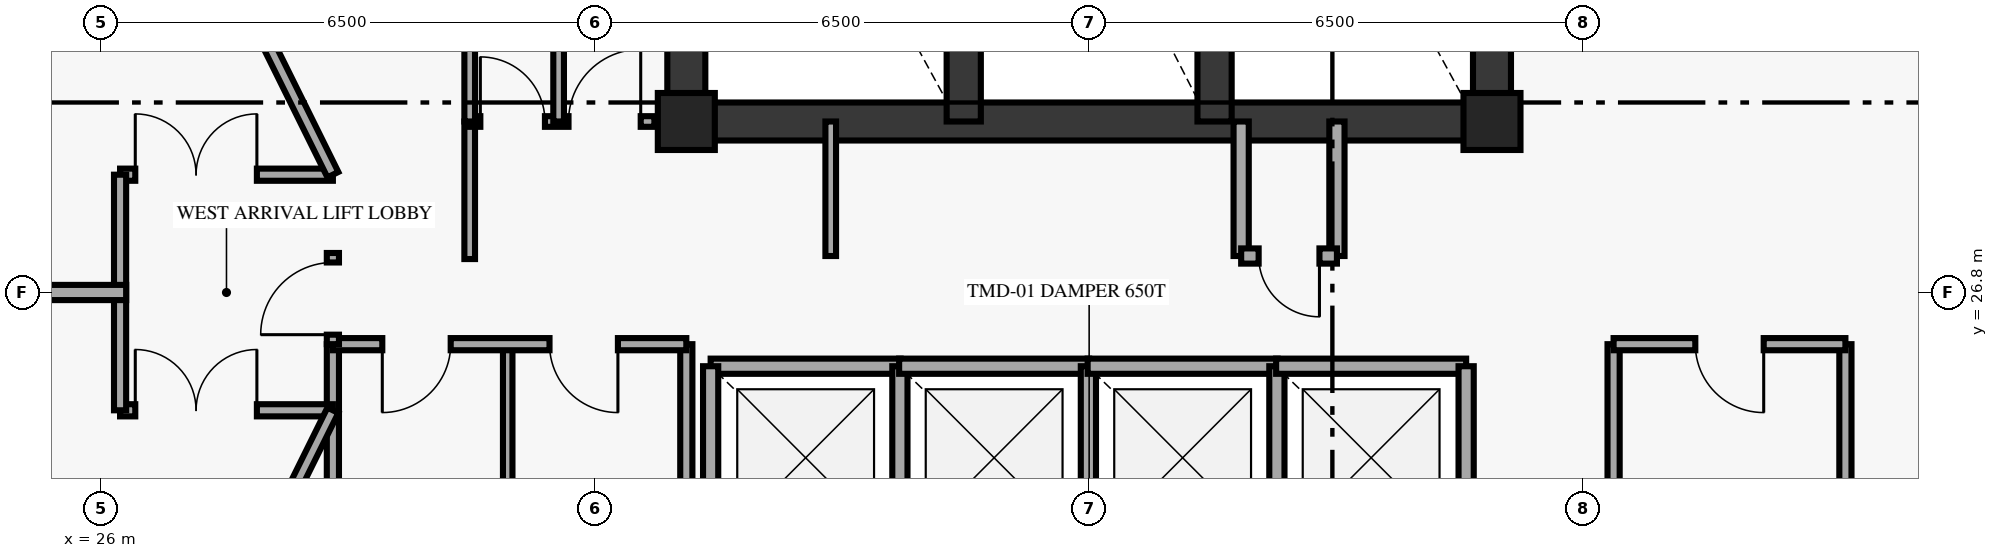
"""IFC4 building model, lengths in metres.
Left out: names, types, materials, properties, quantities, classifications, styles, units other than length and angle.
Written with IfcOpenShell. Run it as: python <this file> out.ifc"""

import sys

from ifc_helpers import new_model, si_unit, direction, frame, frame_2d, origin, origin_2d, place, context, subcontext, project, spatial, rectangle, extrude, element, fill, save


model = new_model("IFC4")
c1 = context("Model", 3, precision=1e-05, world=origin(), true_north=direction((0.0, 1.0)))
c2 = subcontext(c1, "Body", "Model", "MODEL_VIEW")
j1 = project(units=[si_unit("LENGTHUNIT", "METRE"), si_unit("PLANEANGLEUNIT", "RADIAN")], contexts=[c1])
p1 = place(None, origin())
s1 = spatial("IfcSite", under=j1, at=p1, CompositionType="ELEMENT")
p2 = place(p1, origin())
s2 = spatial("IfcBuilding", under=s1, at=p2, CompositionType="ELEMENT")
p3 = place(p2, frame((0.0, 0.0, 306.8)))
s3 = spatial("IfcBuildingStorey", under=s2, at=p3, CompositionType="ELEMENT", Elevation=306.8)
for number, where, z_axis, x_axis in (
    (1, (44.3, 29.05, 0.0), (0.0, 0.0, 1.0), (1.0, 0.0, 0.0)),
    (2, (33.7, 29.05, 0.0), (0.0, 0.0, 1.0), (1.0, 0.0, 0.0)),
):
    element("IfcColumn", number, at=place(p3, frame(where, z_axis=z_axis, x_axis=x_axis)), inside=s3, PredefinedType="PILASTER", context=c2, shape_type="SweptSolid", body=[
        extrude(rectangle(XDim=0.75, YDim=0.75, at=origin_2d()), origin(), (0.0, 0.0, 1.0), 6.18),
    ])
for number, where, z_axis, x_axis in (
    (3, (33.7, 29.05, 0.0), (0.0, 0.0, 1.0), (0.0, 1.0, 0.0)),
    (4, (44.3, 29.05, 0.0), (0.0, 0.0, 1.0), (0.0, 1.0, 0.0)),
):
    element("IfcWall", number, at=place(p3, frame(where, z_axis=z_axis, x_axis=x_axis)), inside=s3, PredefinedType="SHEAR", context=c2, shape_type="SweptSolid", body=[
        extrude(rectangle(XDim=8.35, YDim=0.5, at=frame_2d((4.175, 0.0))), origin(), (0.0, 0.0, 1.0), 6.18),
    ])
p4 = place(p3, frame((33.7, 29.05, 0.0), z_axis=(0.0, 0.0, 1.0), x_axis=(1.0, 0.0, 0.0)))
e5 = element("IfcWall", 5, at=p4, inside=s3, PredefinedType="SHEAR", context=c2, shape_type="SweptSolid", body=[
    extrude(rectangle(XDim=10.6, YDim=0.5, at=frame_2d((5.3, 0.0))), origin(), (0.0, 0.0, 1.0), 6.18),
])
for number, where, z_axis, x_axis in (
    (6, (37.35, 29.05, 0.0), (0.0, 0.0, 1.0), (0.0, 1.0, 0.0)),
    (7, (40.65, 29.05, 0.0), (0.0, 0.0, 1.0), (0.0, 1.0, 0.0)),
):
    element("IfcWall", number, at=place(p3, frame(where, z_axis=z_axis, x_axis=x_axis)), inside=s3, PredefinedType="SHEAR", context=c2, shape_type="SweptSolid", body=[
        extrude(rectangle(XDim=8.35, YDim=0.45, at=frame_2d((4.175, 0.0))), origin(), (0.0, 0.0, 1.0), 6.18),
    ])
p5 = place(p3, frame((35.6, 27.28, 0.0), z_axis=(0.0, 0.0, 1.0), x_axis=(0.0, 1.0, 0.0)))
e8 = element("IfcWall", 8, at=p5, inside=s3, PredefinedType="PARTITIONING", context=c2, shape_type="SweptSolid", body=[
    extrude(rectangle(XDim=1.77, YDim=0.14, at=frame_2d((0.885, 0.0))), origin(), (0.0, 0.0, 1.0), 6.18),
])
p6 = place(p3, frame((41.0, 27.28, 0.0), z_axis=(0.0, 0.0, 1.0), x_axis=(0.0, 1.0, 0.0)))
e9 = element("IfcWall", 9, at=p6, inside=s3, PredefinedType="SOLIDWALL", context=c2, shape_type="SweptSolid", body=[
    extrude(rectangle(XDim=1.77, YDim=0.2, at=frame_2d((0.885, 0.0))), origin(), (0.0, 0.0, 1.0), 5.23),
])
p7 = place(p3, frame((42.26, 27.28, 0.0), z_axis=(0.0, 0.0, 1.0), x_axis=(0.0, 1.0, 0.0)))
e10 = element("IfcWall", 10, at=p7, inside=s3, PredefinedType="SOLIDWALL", context=c2, shape_type="SweptSolid", body=[
    extrude(rectangle(XDim=1.77, YDim=0.2, at=frame_2d((0.885, 0.0))), origin(), (0.0, 0.0, 1.0), 6.18),
])
p8 = place(p3, frame((41.0, 27.28, 0.0), z_axis=(0.0, 0.0, 1.0), x_axis=(1.0, 0.0, 0.0)))
e11 = element("IfcWall", 11, at=p8, inside=s3, PredefinedType="SOLIDWALL", context=c2, shape_type="SweptSolid", body=[
    extrude(rectangle(XDim=1.26, YDim=0.2, at=frame_2d((0.63, 0.0))), origin(), (0.0, 0.0, 1.0), 6.18),
])
p9 = place(p8, frame((0.23, 0.0, 0.0)))
e12 = element("IfcOpeningElement", 12, at=p9, cuts=e11, PredefinedType="OPENING", context=c2, shape_type="SweptSolid", body=[
    extrude(rectangle(XDim=0.8, YDim=2.05, at=frame_2d((0.4, 1.025))), frame((0.0, 0.11, 0.0), z_axis=(0.0, -1.0, 0.0), x_axis=(1.0, 0.0, 0.0)), (0.0, 0.0, 1.0), 0.22),
])
p10 = place(p3, frame((34.02, 25.83, 0.0), z_axis=(0.0, 0.0, 1.0), x_axis=(1.0, 0.0, 0.0)))
e13 = element("IfcWall", 13, at=p10, inside=s3, PredefinedType="SOLIDWALL", context=c2, shape_type="SweptSolid", body=[
    extrude(rectangle(XDim=2.5, YDim=0.2, at=frame_2d((1.25, 0.0))), origin(), (0.0, 0.0, 1.0), 6.18),
])
for number, where, z_axis, x_axis in (
    (14, (34.02, 23.42, 0.0), (0.0, 0.0, 1.0), (0.0, 1.0, 0.0)),
    (15, (36.51, 23.42, 0.0), (0.0, 0.0, 1.0), (0.0, 1.0, 0.0)),
):
    element("IfcWall", number, at=place(p3, frame(where, z_axis=z_axis, x_axis=x_axis)), inside=s3, PredefinedType="SOLIDWALL", context=c2, shape_type="SweptSolid", body=[
        extrude(rectangle(XDim=2.41, YDim=0.2, at=frame_2d((1.205, 0.0))), origin(), (0.0, 0.0, 1.0), 6.18),
    ])
p11 = place(p3, frame((36.5, 25.83, 0.0), z_axis=(0.0, 0.0, 1.0), x_axis=(1.0, 0.0, 0.0)))
e16 = element("IfcWall", 16, at=p11, inside=s3, PredefinedType="SOLIDWALL", context=c2, shape_type="SweptSolid", body=[
    extrude(rectangle(XDim=2.5, YDim=0.2, at=frame_2d((1.25, 0.0))), origin(), (0.0, 0.0, 1.0), 6.18),
])
p12 = place(p3, frame((38.99, 23.42, 0.0), z_axis=(0.0, 0.0, 1.0), x_axis=(0.0, 1.0, 0.0)))
e17 = element("IfcWall", 17, at=p12, inside=s3, PredefinedType="SOLIDWALL", context=c2, shape_type="SweptSolid", body=[
    extrude(rectangle(XDim=2.41, YDim=0.2, at=frame_2d((1.205, 0.0))), origin(), (0.0, 0.0, 1.0), 6.18),
])
p13 = place(p3, frame((38.98, 25.83, 0.0), z_axis=(0.0, 0.0, 1.0), x_axis=(1.0, 0.0, 0.0)))
e18 = element("IfcWall", 18, at=p13, inside=s3, PredefinedType="SOLIDWALL", context=c2, shape_type="SweptSolid", body=[
    extrude(rectangle(XDim=2.5, YDim=0.2, at=frame_2d((1.25, 0.0))), origin(), (0.0, 0.0, 1.0), 6.18),
])
p14 = place(p3, frame((41.47, 23.42, 0.0), z_axis=(0.0, 0.0, 1.0), x_axis=(0.0, 1.0, 0.0)))
e19 = element("IfcWall", 19, at=p14, inside=s3, PredefinedType="SOLIDWALL", context=c2, shape_type="SweptSolid", body=[
    extrude(rectangle(XDim=2.41, YDim=0.2, at=frame_2d((1.205, 0.0))), origin(), (0.0, 0.0, 1.0), 6.18),
])
p15 = place(p3, frame((41.46, 25.83, 0.0), z_axis=(0.0, 0.0, 1.0), x_axis=(1.0, 0.0, 0.0)))
e20 = element("IfcWall", 20, at=p15, inside=s3, PredefinedType="SOLIDWALL", context=c2, shape_type="SweptSolid", body=[
    extrude(rectangle(XDim=2.5, YDim=0.2, at=frame_2d((1.25, 0.0))), origin(), (0.0, 0.0, 1.0), 6.18),
])
p16 = place(p3, frame((43.96, 23.42, 0.0), z_axis=(0.0, 0.0, 1.0), x_axis=(0.0, 1.0, 0.0)))
e21 = element("IfcWall", 21, at=p16, inside=s3, PredefinedType="SOLIDWALL", context=c2, shape_type="SweptSolid", body=[
    extrude(rectangle(XDim=2.41, YDim=0.2, at=frame_2d((1.205, 0.0))), origin(), (0.0, 0.0, 1.0), 6.18),
])
p17 = place(p3, frame((29.05, 19.05, 0.0), z_axis=(0.0, 0.0, 1.0), x_axis=(0.0, 1.0, 0.0)))
e22 = element("IfcWall", 22, at=p17, inside=s3, PredefinedType="PARTITIONING", context=c2, shape_type="SweptSolid", body=[
    extrude(rectangle(XDim=7.07, YDim=0.16, at=frame_2d((3.535, 0.0))), origin(), (0.0, 0.0, 1.0), 6.18),
])
p18 = place(p3, frame((33.7, 23.45, 0.0), z_axis=(0.0, 0.0, 1.0), x_axis=(0.0, 1.0, 0.0)))
e23 = element("IfcWall", 23, at=p18, inside=s3, PredefinedType="PARTITIONING", context=c2, shape_type="SweptSolid", body=[
    extrude(rectangle(XDim=2.67, YDim=0.16, at=frame_2d((1.335, 0.0))), origin(), (0.0, 0.0, 1.0), 6.18),
])
p19 = place(p3, frame((31.35, 19.05, 0.0), z_axis=(0.0, 0.0, 1.0), x_axis=(0.0, 1.0, 0.0)))
e24 = element("IfcWall", 24, at=p19, inside=s3, PredefinedType="PARTITIONING", context=c2, shape_type="SweptSolid", body=[
    extrude(rectangle(XDim=7.07, YDim=0.125, at=frame_2d((3.535, 0.0))), origin(), (0.0, 0.0, 1.0), 6.18),
])
p20 = place(p3, frame((33.7, 26.12, 0.0), z_axis=(0.0, 0.0, 1.0), x_axis=(-1.0, 0.0, 0.0)))
e25 = element("IfcWall", 25, at=p20, inside=s3, PredefinedType="PARTITIONING", context=c2, shape_type="SweptSolid", body=[
    extrude(rectangle(XDim=4.65, YDim=0.16, at=frame_2d((2.325, 0.0))), origin(), (0.0, 0.0, 1.0), 6.18),
])
p21 = place(p20, frame((3.1, 0.0, 0.0)))
e26 = element("IfcOpeningElement", 26, at=p21, cuts=e25, PredefinedType="OPENING", context=c2, shape_type="SweptSolid", body=[
    extrude(rectangle(XDim=0.9, YDim=2.1, at=frame_2d((0.45, 1.05))), frame((0.0, 0.09, 0.0), z_axis=(0.0, -1.0, 0.0), x_axis=(1.0, 0.0, 0.0)), (0.0, 0.0, 1.0), 0.18),
])
p22 = place(p20, frame((0.9, 0.0, 0.0)))
e27 = element("IfcOpeningElement", 27, at=p22, cuts=e25, PredefinedType="OPENING", context=c2, shape_type="SweptSolid", body=[
    extrude(rectangle(XDim=0.9, YDim=2.1, at=frame_2d((0.45, 1.05))), frame((0.0, 0.09, 0.0), z_axis=(0.0, -1.0, 0.0), x_axis=(1.0, 0.0, 0.0)), (0.0, 0.0, 1.0), 0.18),
])
for number, where, z_axis, x_axis in (
    (28, (48.95, 19.05, 0.0), (0.0, 0.0, 1.0), (0.0, 1.0, 0.0)),
    (29, (45.9, 19.05, 0.0), (0.0, 0.0, 1.0), (0.0, 1.0, 0.0)),
):
    element("IfcWall", number, at=place(p3, frame(where, z_axis=z_axis, x_axis=x_axis)), inside=s3, PredefinedType="PARTITIONING", context=c2, shape_type="SweptSolid", body=[
        extrude(rectangle(XDim=7.07, YDim=0.16, at=frame_2d((3.535, 0.0))), origin(), (0.0, 0.0, 1.0), 6.18),
    ])
p23 = place(p3, frame((48.95, 26.12, 0.0), z_axis=(0.0, 0.0, 1.0), x_axis=(-1.0, 0.0, 0.0)))
e30 = element("IfcWall", 30, at=p23, inside=s3, PredefinedType="PARTITIONING", context=c2, shape_type="SweptSolid", body=[
    extrude(rectangle(XDim=3.05, YDim=0.16, at=frame_2d((1.525, 0.0))), origin(), (0.0, 0.0, 1.0), 6.18),
])
p24 = place(p23, frame((1.075, 0.0, 0.0)))
e31 = element("IfcOpeningElement", 31, at=p24, cuts=e30, PredefinedType="OPENING", context=c2, shape_type="SweptSolid", body=[
    extrude(rectangle(XDim=0.9, YDim=2.1, at=frame_2d((0.45, 1.05))), frame((0.0, 0.09, 0.0), z_axis=(0.0, -1.0, 0.0), x_axis=(1.0, 0.0, 0.0)), (0.0, 0.0, 1.0), 0.18),
])
p25 = place(p3, frame((29.05, 26.12, 0.0), z_axis=(0.0, 0.0, 1.0), x_axis=(0.0, 1.0, 0.0)))
e32 = element("IfcWall", 32, at=p25, inside=s3, PredefinedType="PARTITIONING", context=c2, shape_type="SweptSolid", body=[
    extrude(rectangle(XDim=1.2, YDim=0.16, at=frame_2d((0.6, 0.0))), origin(), (0.0, 0.0, 1.0), 6.18),
])
p26 = place(p25, frame((0.125, 0.0, 0.0)))
e33 = element("IfcOpeningElement", 33, at=p26, cuts=e32, PredefinedType="OPENING", context=c2, shape_type="SweptSolid", body=[
    extrude(rectangle(XDim=0.95, YDim=2.15, at=frame_2d((0.475, 1.075))), frame((0.0, 0.09, 0.0), z_axis=(0.0, -1.0, 0.0), x_axis=(1.0, 0.0, 0.0)), (0.0, 0.0, 1.0), 0.18),
])
p27 = place(p3, frame((30.85, 27.24, 0.0), z_axis=(0.0, 0.0, 1.0), x_axis=(0.0, 1.0, 0.0)))
e34 = element("IfcWall", 34, at=p27, inside=s3, PredefinedType="PARTITIONING", context=c2, shape_type="SweptSolid", body=[
    extrude(rectangle(XDim=1.81, YDim=0.14, at=frame_2d((0.905, 0.0))), origin(), (0.0, 0.0, 1.0), 6.18),
])
p28 = place(p3, frame((30.85, 29.05, 0.0), z_axis=(0.0, 0.0, 1.0), x_axis=(1.0, 0.0, 0.0)))
e35 = element("IfcWall", 35, at=p28, inside=s3, PredefinedType="PARTITIONING", context=c2, shape_type="SweptSolid", body=[
    extrude(rectangle(XDim=2.43, YDim=0.14, at=frame_2d((1.215, 0.0))), origin(), (0.0, 0.0, 1.0), 6.18),
])
p29 = place(p28, frame((0.14, 0.0, 0.0)))
e36 = element("IfcOpeningElement", 36, at=p29, cuts=e35, PredefinedType="OPENING", context=c2, shape_type="SweptSolid", body=[
    extrude(rectangle(XDim=0.85, YDim=2.1, at=frame_2d((0.425, 1.05))), frame((0.0, 0.08, 0.0), z_axis=(0.0, -1.0, 0.0), x_axis=(1.0, 0.0, 0.0)), (0.0, 0.0, 1.0), 0.16),
])
p30 = place(p28, frame((1.3, 0.0, 0.0)))
e37 = element("IfcOpeningElement", 37, at=p30, cuts=e35, PredefinedType="OPENING", context=c2, shape_type="SweptSolid", body=[
    extrude(rectangle(XDim=0.95, YDim=2.1, at=frame_2d((0.475, 1.05))), frame((0.0, 0.08, 0.0), z_axis=(0.0, -1.0, 0.0), x_axis=(1.0, 0.0, 0.0)), (0.0, 0.0, 1.0), 0.16),
])
for number, where, z_axis, x_axis in (
    (38, (32.02, 29.05, 0.0), (0.0, 0.0, 1.0), (0.0, 1.0, 0.0)),
    (39, (30.85, 29.05, 0.0), (0.0, 0.0, 1.0), (0.0, 1.0, 0.0)),
):
    element("IfcWall", number, at=place(p3, frame(where, z_axis=z_axis, x_axis=x_axis)), inside=s3, PredefinedType="PARTITIONING", context=c2, shape_type="SweptSolid", body=[
        extrude(rectangle(XDim=5.6, YDim=0.14, at=frame_2d((2.8, 0.0))), origin(), (0.0, 0.0, 1.0), 6.18),
    ])
p31 = place(p3, frame((26.25, 28.35, 0.0), z_axis=(0.0, 0.0, 1.0), x_axis=(1.0, 0.0, 0.0)))
e40 = element("IfcWall", 40, at=p31, inside=s3, PredefinedType="PARTITIONING", context=c2, shape_type="SweptSolid", body=[
    extrude(rectangle(XDim=2.8, YDim=0.16, at=frame_2d((1.4, 0.0))), origin(), (0.0, 0.0, 1.0), 6.18),
])
p32 = place(p31, frame((0.2, 0.0, 0.0)))
e41 = element("IfcOpeningElement", 41, at=p32, cuts=e40, PredefinedType="OPENING", context=c2, shape_type="SweptSolid", body=[
    extrude(rectangle(XDim=1.6, YDim=2.2, at=frame_2d((0.8, 1.1))), frame((0.0, 0.09, 0.0), z_axis=(0.0, -1.0, 0.0), x_axis=(1.0, 0.0, 0.0)), (0.0, 0.0, 1.0), 0.18),
])
p33 = place(p3, frame((26.25, 25.25, 0.0), z_axis=(0.0, 0.0, 1.0), x_axis=(1.0, 0.0, 0.0)))
e42 = element("IfcWall", 42, at=p33, inside=s3, PredefinedType="PARTITIONING", context=c2, shape_type="SweptSolid", body=[
    extrude(rectangle(XDim=2.8, YDim=0.16, at=frame_2d((1.4, 0.0))), origin(), (0.0, 0.0, 1.0), 6.18),
])
p34 = place(p33, frame((0.2, 0.0, 0.0)))
e43 = element("IfcOpeningElement", 43, at=p34, cuts=e42, PredefinedType="OPENING", context=c2, shape_type="SweptSolid", body=[
    extrude(rectangle(XDim=1.6, YDim=2.2, at=frame_2d((0.8, 1.1))), frame((0.0, 0.09, 0.0), z_axis=(0.0, -1.0, 0.0), x_axis=(1.0, 0.0, 0.0)), (0.0, 0.0, 1.0), 0.18),
])
p35 = place(p3, frame((26.25, 25.25, 0.0), z_axis=(0.0, 0.0, 1.0), x_axis=(0.0, 1.0, 0.0)))
e44 = element("IfcWall", 44, at=p35, inside=s3, PredefinedType="PARTITIONING", context=c2, shape_type="SweptSolid", body=[
    extrude(rectangle(XDim=3.1, YDim=0.16, at=frame_2d((1.55, 0.0))), origin(), (0.0, 0.0, 1.0), 6.18),
])
for number, where, z_axis, x_axis in (
    (45, (27.988, 30.496, 0.0), (0.0, 0.0, 1.0), (0.444, -0.896, 0.0)),
    (46, (27.988, 23.104, 0.0), (0.0, 0.0, 1.0), (0.444, 0.896, 0.0)),
):
    element("IfcWall", number, at=place(p3, frame(where, z_axis=z_axis, x_axis=x_axis)), inside=s3, PredefinedType="PARTITIONING", context=c2, shape_type="SweptSolid", body=[
        extrude(rectangle(XDim=2.394, YDim=0.16, at=frame_2d((1.197, 0.0))), origin(), (0.0, 0.0, 1.0), 6.18),
    ])
p36 = place(p3, frame((26.33, 26.8, 0.0), z_axis=(0.0, 0.0, 1.0), x_axis=(-1.0, 0.0, 0.0)))
e47 = element("IfcWall", 47, at=p36, inside=s3, PredefinedType="PARTITIONING", context=c2, shape_type="SweptSolid", body=[
    extrude(rectangle(XDim=6.255, YDim=0.2, at=frame_2d((3.127, 0.0))), origin(), (0.0, 0.0, 1.0), 6.18),
])
p37 = place(p9, origin())
e48 = element("IfcDoor", 48, at=p37, inside=s3, OperationType="SINGLE_SWING_RIGHT", PredefinedType="DOOR", context=c2, shape_type="SweptSolid", body=[
    extrude(rectangle(XDim=0.8, YDim=2.05, at=frame_2d((0.4, 1.025))), frame((0.0, 0.025, 0.0), z_axis=(0.0, -1.0, 0.0), x_axis=(1.0, 0.0, 0.0)), (0.0, 0.0, 1.0), 0.05),
])
fill(e12, e48)
p38 = place(p21, origin())
e49 = element("IfcDoor", 49, at=p38, inside=s3, OperationType="SINGLE_SWING_RIGHT", PredefinedType="DOOR", context=c2, shape_type="SweptSolid", body=[
    extrude(rectangle(XDim=0.9, YDim=2.1, at=frame_2d((0.45, 1.05))), frame((0.0, 0.025, 0.0), z_axis=(0.0, -1.0, 0.0), x_axis=(1.0, 0.0, 0.0)), (0.0, 0.0, 1.0), 0.05),
])
fill(e26, e49)
p39 = place(p22, origin())
e50 = element("IfcDoor", 50, at=p39, inside=s3, OperationType="SINGLE_SWING_LEFT", PredefinedType="DOOR", context=c2, shape_type="SweptSolid", body=[
    extrude(rectangle(XDim=0.9, YDim=2.1, at=frame_2d((0.45, 1.05))), frame((0.0, 0.025, 0.0), z_axis=(0.0, -1.0, 0.0), x_axis=(1.0, 0.0, 0.0)), (0.0, 0.0, 1.0), 0.05),
])
fill(e27, e50)
p40 = place(p24, origin())
e51 = element("IfcDoor", 51, at=p40, inside=s3, OperationType="SINGLE_SWING_LEFT", PredefinedType="DOOR", context=c2, shape_type="SweptSolid", body=[
    extrude(rectangle(XDim=0.9, YDim=2.1, at=frame_2d((0.45, 1.05))), frame((0.0, 0.025, 0.0), z_axis=(0.0, -1.0, 0.0), x_axis=(1.0, 0.0, 0.0)), (0.0, 0.0, 1.0), 0.05),
])
fill(e31, e51)
p41 = place(p26, origin())
e52 = element("IfcDoor", 52, at=p41, inside=s3, OperationType="SINGLE_SWING_RIGHT", PredefinedType="DOOR", context=c2, shape_type="SweptSolid", body=[
    extrude(rectangle(XDim=0.95, YDim=2.15, at=frame_2d((0.475, 1.075))), frame((0.0, 0.025, 0.0), z_axis=(0.0, -1.0, 0.0), x_axis=(1.0, 0.0, 0.0)), (0.0, 0.0, 1.0), 0.05),
])
fill(e33, e52)
p42 = place(p29, origin())
e53 = element("IfcDoor", 53, at=p42, inside=s3, OperationType="SINGLE_SWING_LEFT", PredefinedType="DOOR", context=c2, shape_type="SweptSolid", body=[
    extrude(rectangle(XDim=0.85, YDim=2.1, at=frame_2d((0.425, 1.05))), frame((0.0, 0.025, 0.0), z_axis=(0.0, -1.0, 0.0), x_axis=(1.0, 0.0, 0.0)), (0.0, 0.0, 1.0), 0.05),
])
fill(e36, e53)
p43 = place(p30, origin())
e54 = element("IfcDoor", 54, at=p43, inside=s3, OperationType="SINGLE_SWING_RIGHT", PredefinedType="DOOR", context=c2, shape_type="SweptSolid", body=[
    extrude(rectangle(XDim=0.95, YDim=2.1, at=frame_2d((0.475, 1.05))), frame((0.0, 0.025, 0.0), z_axis=(0.0, -1.0, 0.0), x_axis=(1.0, 0.0, 0.0)), (0.0, 0.0, 1.0), 0.05),
])
fill(e37, e54)
p44 = place(p32, origin())
e55 = element("IfcDoor", 55, at=p44, inside=s3, OperationType="DOUBLE_DOOR_SINGLE_SWING", PredefinedType="DOOR", context=c2, shape_type="SweptSolid", body=[
    extrude(rectangle(XDim=1.6, YDim=2.2, at=frame_2d((0.8, 1.1))), frame((0.0, 0.025, 0.0), z_axis=(0.0, -1.0, 0.0), x_axis=(1.0, 0.0, 0.0)), (0.0, 0.0, 1.0), 0.05),
])
fill(e41, e55)
p45 = place(p34, origin())
e56 = element("IfcDoor", 56, at=p45, inside=s3, OperationType="DOUBLE_DOOR_SINGLE_SWING", PredefinedType="DOOR", context=c2, shape_type="SweptSolid", body=[
    extrude(rectangle(XDim=1.6, YDim=2.2, at=frame_2d((0.8, 1.1))), frame((0.0, 0.025, 0.0), z_axis=(0.0, -1.0, 0.0), x_axis=(1.0, 0.0, 0.0)), (0.0, 0.0, 1.0), 0.05),
])
fill(e43, e56)
save(model, sys.argv[1])
